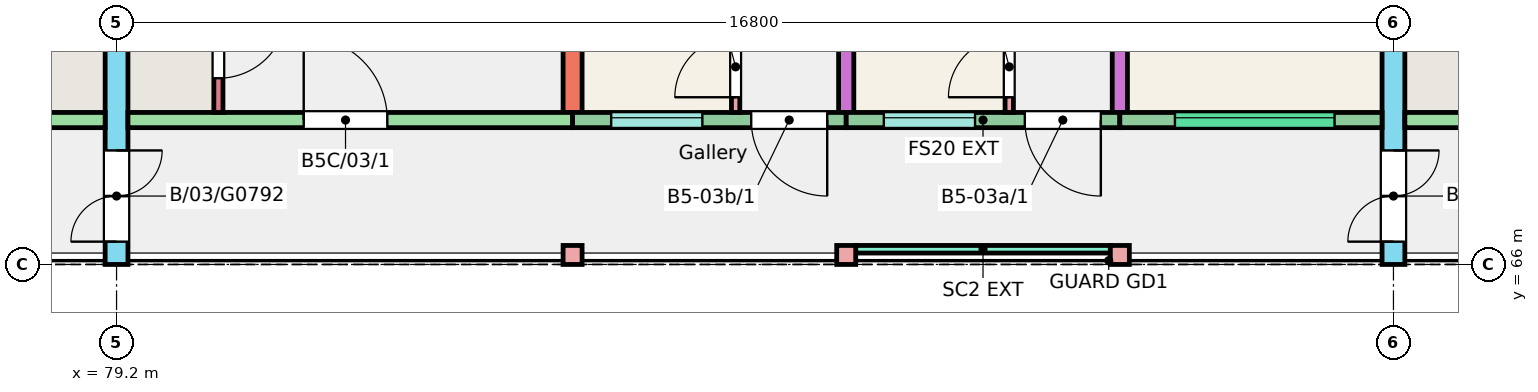
"""IFC4 building model, lengths in metres.
Left out: names, types, materials, properties, quantities, classifications, styles, units other than length and angle.
Written with IfcOpenShell. Run it as: python <this file> out.ifc"""

import sys

from ifc_helpers import new_model, si_unit, direction, frame, frame_2d, origin, origin_2d, place, context, subcontext, project, spatial, rectangle, extrude, element, fill, save


model = new_model("IFC4")
c1 = context("Model", 3, precision=1e-05, world=origin(), true_north=direction((0.0, 1.0)))
c2 = subcontext(c1, "Body", "Model", "MODEL_VIEW")
j1 = project(units=[si_unit("LENGTHUNIT", "METRE"), si_unit("PLANEANGLEUNIT", "RADIAN")], contexts=[c1])
p1 = place(None, origin())
s1 = spatial("IfcSite", under=j1, at=p1, CompositionType="ELEMENT")
p2 = place(p1, origin())
s2 = spatial("IfcBuilding", under=s1, at=p2, CompositionType="ELEMENT")
p3 = place(p2, frame((0.0, 0.0, 9.0)))
s3 = spatial("IfcBuildingStorey", under=s2, at=p3, CompositionType="ELEMENT", Elevation=9.0)
p4 = place(p3, frame((79.2, 66.0, 0.0), z_axis=(0.0, 0.0, 1.0), x_axis=(0.0, 1.0, 0.0)))
e1 = element("IfcWall", 1, at=p4, inside=s3, PredefinedType="SHEAR", context=c2, shape_type="SweptSolid", body=[
    extrude(rectangle(XDim=11.0, YDim=0.3, at=frame_2d((5.5, 0.0))), origin(), (0.0, 0.0, 1.0), 3.0),
])
p5 = place(p4, frame((0.3, 0.0, 0.0)))
e2 = element("IfcOpeningElement", 2, at=p5, cuts=e1, PredefinedType="OPENING", context=c2, shape_type="SweptSolid", body=[
    extrude(rectangle(XDim=1.2, YDim=2.1, at=frame_2d((0.6, 1.05))), frame((0.0, 0.16, 0.0), z_axis=(0.0, -1.0, 0.0), x_axis=(1.0, 0.0, 0.0)), (0.0, 0.0, 1.0), 0.32),
])
p6 = place(p3, frame((85.2, 68.0, 0.0), z_axis=(0.0, 0.0, 1.0), x_axis=(0.0, 1.0, 0.0)))
e3 = element("IfcWall", 3, at=p6, inside=s3, PredefinedType="SHEAR", context=c2, shape_type="SweptSolid", body=[
    extrude(rectangle(XDim=9.0, YDim=0.25, at=frame_2d((4.5, 0.0))), origin(), (0.0, 0.0, 1.0), 3.0),
])
p7 = place(p3, frame((88.8, 68.0, 0.0), z_axis=(0.0, 0.0, 1.0), x_axis=(0.0, 1.0, 0.0)))
e4 = element("IfcWall", 4, at=p7, inside=s3, PredefinedType="SHEAR", context=c2, shape_type="SweptSolid", body=[
    extrude(rectangle(XDim=9.0, YDim=0.2, at=frame_2d((4.5, 0.0))), origin(), (0.0, 0.0, 1.0), 3.0),
])
p8 = place(p3, frame((92.4, 68.0, 0.0), z_axis=(0.0, 0.0, 1.0), x_axis=(0.0, 1.0, 0.0)))
e5 = element("IfcWall", 5, at=p8, inside=s3, PredefinedType="SHEAR", context=c2, shape_type="SweptSolid", body=[
    extrude(rectangle(XDim=9.0, YDim=0.2, at=frame_2d((4.5, 0.0))), origin(), (0.0, 0.0, 1.0), 3.0),
])
p9 = place(p8, frame((2.4, 0.0, 0.0)))
e6 = element("IfcOpeningElement", 6, at=p9, cuts=e5, PredefinedType="OPENING", context=c2, shape_type="SweptSolid", body=[
    extrude(rectangle(XDim=1.2, YDim=2.1, at=frame_2d((0.6, 1.05))), frame((0.0, 0.11, 0.0), z_axis=(0.0, -1.0, 0.0), x_axis=(1.0, 0.0, 0.0)), (0.0, 0.0, 1.0), 0.22),
])
p10 = place(p8, frame((6.4, 0.0, 0.0)))
e7 = element("IfcOpeningElement", 7, at=p10, cuts=e5, PredefinedType="OPENING", context=c2, shape_type="SweptSolid", body=[
    extrude(rectangle(XDim=1.2, YDim=2.1, at=frame_2d((0.6, 1.05))), frame((0.0, 0.11, 0.0), z_axis=(0.0, -1.0, 0.0), x_axis=(1.0, 0.0, 0.0)), (0.0, 0.0, 1.0), 0.22),
])
p11 = place(p3, frame((96.0, 66.0, 0.0), z_axis=(0.0, 0.0, 1.0), x_axis=(0.0, 1.0, 0.0)))
e8 = element("IfcWall", 8, at=p11, inside=s3, PredefinedType="SHEAR", context=c2, shape_type="SweptSolid", body=[
    extrude(rectangle(XDim=11.0, YDim=0.3, at=frame_2d((5.5, 0.0))), origin(), (0.0, 0.0, 1.0), 3.0),
])
p12 = place(p11, frame((0.3, 0.0, 0.0)))
e9 = element("IfcOpeningElement", 9, at=p12, cuts=e8, PredefinedType="OPENING", context=c2, shape_type="SweptSolid", body=[
    extrude(rectangle(XDim=1.2, YDim=2.1, at=frame_2d((0.6, 1.05))), frame((0.0, 0.16, 0.0), z_axis=(0.0, -1.0, 0.0), x_axis=(1.0, 0.0, 0.0)), (0.0, 0.0, 1.0), 0.32),
])
p13 = place(p3, frame((73.2, 67.9, 0.0), z_axis=(0.0, 0.0, 1.0), x_axis=(1.0, 0.0, 0.0)))
e10 = element("IfcWall", 10, at=p13, inside=s3, PredefinedType="SHEAR", context=c2, shape_type="SweptSolid", body=[
    extrude(rectangle(XDim=5.85, YDim=0.2, at=frame_2d((2.925, 0.0))), origin(), (0.0, 0.0, 1.0), 3.0),
])
p14 = place(p13, frame((2.438, 0.0, 0.0)))
e11 = element("IfcOpeningElement", 11, at=p14, cuts=e10, PredefinedType="OPENING", context=c2, shape_type="SweptSolid", body=[
    extrude(rectangle(XDim=1.1, YDim=2.1, at=frame_2d((0.55, 1.05))), frame((0.0, 0.11, 0.0), z_axis=(0.0, -1.0, 0.0), x_axis=(1.0, 0.0, 0.0)), (0.0, 0.0, 1.0), 0.22),
])
p15 = place(p3, frame((79.35, 67.9, 0.0), z_axis=(0.0, 0.0, 1.0), x_axis=(1.0, 0.0, 0.0)))
e12 = element("IfcWall", 12, at=p15, inside=s3, PredefinedType="SHEAR", context=c2, shape_type="SweptSolid", body=[
    extrude(rectangle(XDim=5.85, YDim=0.2, at=frame_2d((2.925, 0.0))), origin(), (0.0, 0.0, 1.0), 3.0),
])
p16 = place(p15, frame((2.312, 0.0, 0.0)))
e13 = element("IfcOpeningElement", 13, at=p16, cuts=e12, PredefinedType="OPENING", context=c2, shape_type="SweptSolid", body=[
    extrude(rectangle(XDim=1.1, YDim=2.1, at=frame_2d((0.55, 1.05))), frame((0.0, 0.11, 0.0), z_axis=(0.0, -1.0, 0.0), x_axis=(1.0, 0.0, 0.0)), (0.0, 0.0, 1.0), 0.22),
])
p17 = place(p3, frame((80.54, 68.0, 0.0), z_axis=(0.0, 0.0, 1.0), x_axis=(0.0, 1.0, 0.0)))
e14 = element("IfcWall", 14, at=p17, inside=s3, PredefinedType="SHEAR", context=c2, shape_type="SweptSolid", body=[
    extrude(rectangle(XDim=1.72, YDim=0.12, at=frame_2d((0.86, 0.0))), origin(), (0.0, 0.0, 1.0), 3.0),
])
p18 = place(p17, frame((0.45, 0.0, 0.0)))
e15 = element("IfcOpeningElement", 15, at=p18, cuts=e14, PredefinedType="OPENING", context=c2, shape_type="SweptSolid", body=[
    extrude(rectangle(XDim=0.9, YDim=2.1, at=frame_2d((0.45, 1.05))), frame((0.0, 0.07, 0.0), z_axis=(0.0, -1.0, 0.0), x_axis=(1.0, 0.0, 0.0)), (0.0, 0.0, 1.0), 0.14),
])
p19 = place(p3, frame((85.2, 67.9, 0.0), z_axis=(0.0, 0.0, 1.0), x_axis=(1.0, 0.0, 0.0)))
e16 = element("IfcWall", 16, at=p19, inside=s3, PredefinedType="SOLIDWALL", context=c2, shape_type="SweptSolid", body=[
    extrude(rectangle(XDim=3.6, YDim=0.2, at=frame_2d((1.8, 0.0))), origin(), (0.0, 0.0, 1.0), 3.0),
])
p20 = place(p19, frame((0.508, 0.0, 1.1)))
e17 = element("IfcOpeningElement", 17, at=p20, cuts=e16, PredefinedType="OPENING", context=c2, shape_type="SweptSolid", body=[
    extrude(rectangle(XDim=1.2, YDim=1.3, at=frame_2d((0.6, 0.65))), frame((0.0, 0.11, 0.0), z_axis=(0.0, -1.0, 0.0), x_axis=(1.0, 0.0, 0.0)), (0.0, 0.0, 1.0), 0.22),
])
p21 = place(p19, frame((2.35, 0.0, 0.0)))
e18 = element("IfcOpeningElement", 18, at=p21, cuts=e16, PredefinedType="OPENING", context=c2, shape_type="SweptSolid", body=[
    extrude(rectangle(XDim=1.0, YDim=2.1, at=frame_2d((0.5, 1.05))), frame((0.0, 0.11, 0.0), z_axis=(0.0, -1.0, 0.0), x_axis=(1.0, 0.0, 0.0)), (0.0, 0.0, 1.0), 0.22),
])
p22 = place(p3, frame((88.8, 67.9, 0.0), z_axis=(0.0, 0.0, 1.0), x_axis=(1.0, 0.0, 0.0)))
e19 = element("IfcWall", 19, at=p22, inside=s3, PredefinedType="SOLIDWALL", context=c2, shape_type="SweptSolid", body=[
    extrude(rectangle(XDim=3.6, YDim=0.2, at=frame_2d((1.8, 0.0))), origin(), (0.0, 0.0, 1.0), 3.0),
])
p23 = place(p22, frame((0.495, 0.0, 1.1)))
e20 = element("IfcOpeningElement", 20, at=p23, cuts=e19, PredefinedType="OPENING", context=c2, shape_type="SweptSolid", body=[
    extrude(rectangle(XDim=1.2, YDim=1.3, at=frame_2d((0.6, 0.65))), frame((0.0, 0.11, 0.0), z_axis=(0.0, -1.0, 0.0), x_axis=(1.0, 0.0, 0.0)), (0.0, 0.0, 1.0), 0.22),
])
p24 = place(p22, frame((2.35, 0.0, 0.0)))
e21 = element("IfcOpeningElement", 21, at=p24, cuts=e19, PredefinedType="OPENING", context=c2, shape_type="SweptSolid", body=[
    extrude(rectangle(XDim=1.0, YDim=2.1, at=frame_2d((0.5, 1.05))), frame((0.0, 0.11, 0.0), z_axis=(0.0, -1.0, 0.0), x_axis=(1.0, 0.0, 0.0)), (0.0, 0.0, 1.0), 0.22),
])
p25 = place(p3, frame((92.4, 67.9, 0.0), z_axis=(0.0, 0.0, 1.0), x_axis=(1.0, 0.0, 0.0)))
e22 = element("IfcWall", 22, at=p25, inside=s3, PredefinedType="SOLIDWALL", context=c2, shape_type="SweptSolid", body=[
    extrude(rectangle(XDim=3.45, YDim=0.2, at=frame_2d((1.725, 0.0))), origin(), (0.0, 0.0, 1.0), 3.0),
])
p26 = place(p25, frame((0.725, 0.0, 1.2)))
e23 = element("IfcOpeningElement", 23, at=p26, cuts=e22, PredefinedType="OPENING", context=c2, shape_type="SweptSolid", body=[
    extrude(rectangle(XDim=2.1, YDim=1.2, at=frame_2d((1.05, 0.6))), frame((0.0, 0.11, 0.0), z_axis=(0.0, -1.0, 0.0), x_axis=(1.0, 0.0, 0.0)), (0.0, 0.0, 1.0), 0.22),
])
p27 = place(p3, frame((96.15, 67.9, 0.0), z_axis=(0.0, 0.0, 1.0), x_axis=(1.0, 0.0, 0.0)))
e24 = element("IfcWall", 24, at=p27, inside=s3, PredefinedType="SHEAR", context=c2, shape_type="SweptSolid", body=[
    extrude(rectangle(XDim=5.85, YDim=0.2, at=frame_2d((2.925, 0.0))), origin(), (0.0, 0.0, 1.0), 3.0),
])
p28 = place(p27, frame((2.312, 0.0, 0.0)))
e25 = element("IfcOpeningElement", 25, at=p28, cuts=e24, PredefinedType="OPENING", context=c2, shape_type="SweptSolid", body=[
    extrude(rectangle(XDim=1.1, YDim=2.1, at=frame_2d((0.55, 1.05))), frame((0.0, 0.11, 0.0), z_axis=(0.0, -1.0, 0.0), x_axis=(1.0, 0.0, 0.0)), (0.0, 0.0, 1.0), 0.22),
])
for number, where, z_axis, x_axis in (
    (26, (85.2, 66.125, 0.0), (0.0, 0.0, 1.0), (1.0, 0.0, 0.0)),
    (27, (88.8, 66.125, 0.0), (0.0, 0.0, 1.0), (1.0, 0.0, 0.0)),
    (28, (92.4, 66.125, 0.0), (0.0, 0.0, 1.0), (1.0, 0.0, 0.0)),
):
    element("IfcColumn", number, at=place(p3, frame(where, z_axis=z_axis, x_axis=x_axis)), inside=s3, PredefinedType="COLUMN", context=c2, shape_type="SweptSolid", body=[
        extrude(rectangle(XDim=0.25, YDim=0.25, at=origin_2d()), origin(), (0.0, 0.0, 1.0), 3.0),
    ])
p29 = place(p3, frame((88.925, 66.2, 0.0), z_axis=(0.0, 0.0, 1.0), x_axis=(1.0, 0.0, 0.0)))
e29 = element("IfcWall", 29, at=p29, inside=s3, PredefinedType="SOLIDWALL", context=c2, shape_type="SweptSolid", body=[
    extrude(rectangle(XDim=3.35, YDim=0.1, at=frame_2d((1.675, 0.0))), origin(), (0.0, 0.0, 1.0), 2.45),
])
p30 = place(p3, frame((90.945, 68.0, 0.0), z_axis=(0.0, 0.0, 1.0), x_axis=(0.0, 1.0, 0.0)))
e30 = element("IfcWall", 30, at=p30, inside=s3, PredefinedType="PARTITIONING", context=c2, shape_type="SweptSolid", body=[
    extrude(rectangle(XDim=4.3, YDim=0.11, at=frame_2d((2.15, 0.0))), origin(), (0.0, 0.0, 1.0), 2.8),
])
p31 = place(p30, frame((0.2, 0.0, 0.0)))
e31 = element("IfcOpeningElement", 31, at=p31, cuts=e30, PredefinedType="OPENING", context=c2, shape_type="SweptSolid", body=[
    extrude(rectangle(XDim=0.8, YDim=2.1, at=frame_2d((0.4, 1.05))), frame((0.0, 0.065, 0.0), z_axis=(0.0, -1.0, 0.0), x_axis=(1.0, 0.0, 0.0)), (0.0, 0.0, 1.0), 0.13),
])
p32 = place(p30, frame((3.35, 0.0, 0.0)))
e32 = element("IfcOpeningElement", 32, at=p32, cuts=e30, PredefinedType="OPENING", context=c2, shape_type="SweptSolid", body=[
    extrude(rectangle(XDim=0.8, YDim=2.1, at=frame_2d((0.4, 1.05))), frame((0.0, 0.065, 0.0), z_axis=(0.0, -1.0, 0.0), x_axis=(1.0, 0.0, 0.0)), (0.0, 0.0, 1.0), 0.13),
])
p33 = place(p3, frame((87.345, 68.0, 0.0), z_axis=(0.0, 0.0, 1.0), x_axis=(0.0, 1.0, 0.0)))
e33 = element("IfcWall", 33, at=p33, inside=s3, PredefinedType="PARTITIONING", context=c2, shape_type="SweptSolid", body=[
    extrude(rectangle(XDim=4.5, YDim=0.11, at=frame_2d((2.25, 0.0))), origin(), (0.0, 0.0, 1.0), 2.8),
])
p34 = place(p33, frame((0.2, 0.0, 0.0)))
e34 = element("IfcOpeningElement", 34, at=p34, cuts=e33, PredefinedType="OPENING", context=c2, shape_type="SweptSolid", body=[
    extrude(rectangle(XDim=0.8, YDim=2.1, at=frame_2d((0.4, 1.05))), frame((0.0, 0.065, 0.0), z_axis=(0.0, -1.0, 0.0), x_axis=(1.0, 0.0, 0.0)), (0.0, 0.0, 1.0), 0.13),
])
p35 = place(p33, frame((3.55, 0.0, 0.0)))
e35 = element("IfcOpeningElement", 35, at=p35, cuts=e33, PredefinedType="OPENING", context=c2, shape_type="SweptSolid", body=[
    extrude(rectangle(XDim=0.8, YDim=2.1, at=frame_2d((0.4, 1.05))), frame((0.0, 0.065, 0.0), z_axis=(0.0, -1.0, 0.0), x_axis=(1.0, 0.0, 0.0)), (0.0, 0.0, 1.0), 0.13),
])
p36 = place(p26, origin())
e36 = element("IfcWindow", 36, at=p36, inside=s3, PartitioningType="SINGLE_PANEL", PredefinedType="WINDOW", context=c2, shape_type="SweptSolid", body=[
    extrude(rectangle(XDim=2.1, YDim=1.2, at=frame_2d((1.05, 0.6))), frame((0.0, 0.06, 0.0), z_axis=(0.0, -1.0, 0.0), x_axis=(1.0, 0.0, 0.0)), (0.0, 0.0, 1.0), 0.06),
])
fill(e23, e36)
p37 = place(p23, origin())
e37 = element("IfcWindow", 37, at=p37, inside=s3, PartitioningType="SINGLE_PANEL", PredefinedType="WINDOW", context=c2, shape_type="SweptSolid", body=[
    extrude(rectangle(XDim=1.2, YDim=1.3, at=frame_2d((0.6, 0.65))), frame((0.0, 0.06, 0.0), z_axis=(0.0, -1.0, 0.0), x_axis=(1.0, 0.0, 0.0)), (0.0, 0.0, 1.0), 0.06),
])
fill(e20, e37)
p38 = place(p20, origin())
e38 = element("IfcWindow", 38, at=p38, inside=s3, PartitioningType="SINGLE_PANEL", PredefinedType="WINDOW", context=c2, shape_type="SweptSolid", body=[
    extrude(rectangle(XDim=1.2, YDim=1.3, at=frame_2d((0.6, 0.65))), frame((0.0, 0.06, 0.0), z_axis=(0.0, -1.0, 0.0), x_axis=(1.0, 0.0, 0.0)), (0.0, 0.0, 1.0), 0.06),
])
fill(e17, e38)
p39 = place(p24, origin())
e39 = element("IfcDoor", 39, at=p39, inside=s3, OperationType="SINGLE_SWING_RIGHT", PredefinedType="DOOR", context=c2, shape_type="SweptSolid", body=[
    extrude(rectangle(XDim=1.0, YDim=2.1, at=frame_2d((0.5, 1.05))), frame((0.0, 0.025, 0.0), z_axis=(0.0, -1.0, 0.0), x_axis=(1.0, 0.0, 0.0)), (0.0, 0.0, 1.0), 0.05),
])
fill(e21, e39)
p40 = place(p31, origin())
e40 = element("IfcDoor", 40, at=p40, inside=s3, OperationType="SINGLE_SWING_LEFT", PredefinedType="DOOR", context=c2, shape_type="SweptSolid", body=[
    extrude(rectangle(XDim=0.8, YDim=2.1, at=frame_2d((0.4, 1.05))), frame((0.0, 0.025, 0.0), z_axis=(0.0, -1.0, 0.0), x_axis=(1.0, 0.0, 0.0)), (0.0, 0.0, 1.0), 0.05),
])
fill(e31, e40)
p41 = place(p21, origin())
e41 = element("IfcDoor", 41, at=p41, inside=s3, OperationType="SINGLE_SWING_RIGHT", PredefinedType="DOOR", context=c2, shape_type="SweptSolid", body=[
    extrude(rectangle(XDim=1.0, YDim=2.1, at=frame_2d((0.5, 1.05))), frame((0.0, 0.025, 0.0), z_axis=(0.0, -1.0, 0.0), x_axis=(1.0, 0.0, 0.0)), (0.0, 0.0, 1.0), 0.05),
])
fill(e18, e41)
p42 = place(p34, origin())
e42 = element("IfcDoor", 42, at=p42, inside=s3, OperationType="SINGLE_SWING_LEFT", PredefinedType="DOOR", context=c2, shape_type="SweptSolid", body=[
    extrude(rectangle(XDim=0.8, YDim=2.1, at=frame_2d((0.4, 1.05))), frame((0.0, 0.025, 0.0), z_axis=(0.0, -1.0, 0.0), x_axis=(1.0, 0.0, 0.0)), (0.0, 0.0, 1.0), 0.05),
])
fill(e34, e42)
p43 = place(p16, origin())
e43 = element("IfcDoor", 43, at=p43, inside=s3, OperationType="SINGLE_SWING_LEFT", PredefinedType="DOOR", context=c2, shape_type="SweptSolid", body=[
    extrude(rectangle(XDim=1.1, YDim=2.1, at=frame_2d((0.55, 1.05))), frame((0.0, 0.025, 0.0), z_axis=(0.0, -1.0, 0.0), x_axis=(1.0, 0.0, 0.0)), (0.0, 0.0, 1.0), 0.05),
])
fill(e13, e43)
p44 = place(p18, origin())
e44 = element("IfcDoor", 44, at=p44, inside=s3, OperationType="SINGLE_SWING_RIGHT", PredefinedType="DOOR", context=c2, shape_type="SweptSolid", body=[
    extrude(rectangle(XDim=0.9, YDim=2.1, at=frame_2d((0.45, 1.05))), frame((0.0, 0.025, 0.0), z_axis=(0.0, -1.0, 0.0), x_axis=(1.0, 0.0, 0.0)), (0.0, 0.0, 1.0), 0.05),
])
fill(e15, e44)
p45 = place(p5, origin())
e45 = element("IfcDoor", 45, at=p45, inside=s3, OperationType="DOUBLE_DOOR_SINGLE_SWING", PredefinedType="DOOR", context=c2, shape_type="SweptSolid", body=[
    extrude(rectangle(XDim=1.2, YDim=2.1, at=frame_2d((0.6, 1.05))), frame((0.0, 0.025, 0.0), z_axis=(0.0, -1.0, 0.0), x_axis=(1.0, 0.0, 0.0)), (0.0, 0.0, 1.0), 0.05),
])
fill(e2, e45)
p46 = place(p12, origin())
e46 = element("IfcDoor", 46, at=p46, inside=s3, OperationType="DOUBLE_DOOR_SINGLE_SWING", PredefinedType="DOOR", context=c2, shape_type="SweptSolid", body=[
    extrude(rectangle(XDim=1.2, YDim=2.1, at=frame_2d((0.6, 1.05))), frame((0.0, 0.025, 0.0), z_axis=(0.0, -1.0, 0.0), x_axis=(1.0, 0.0, 0.0)), (0.0, 0.0, 1.0), 0.05),
])
fill(e9, e46)
save(model, sys.argv[1])
